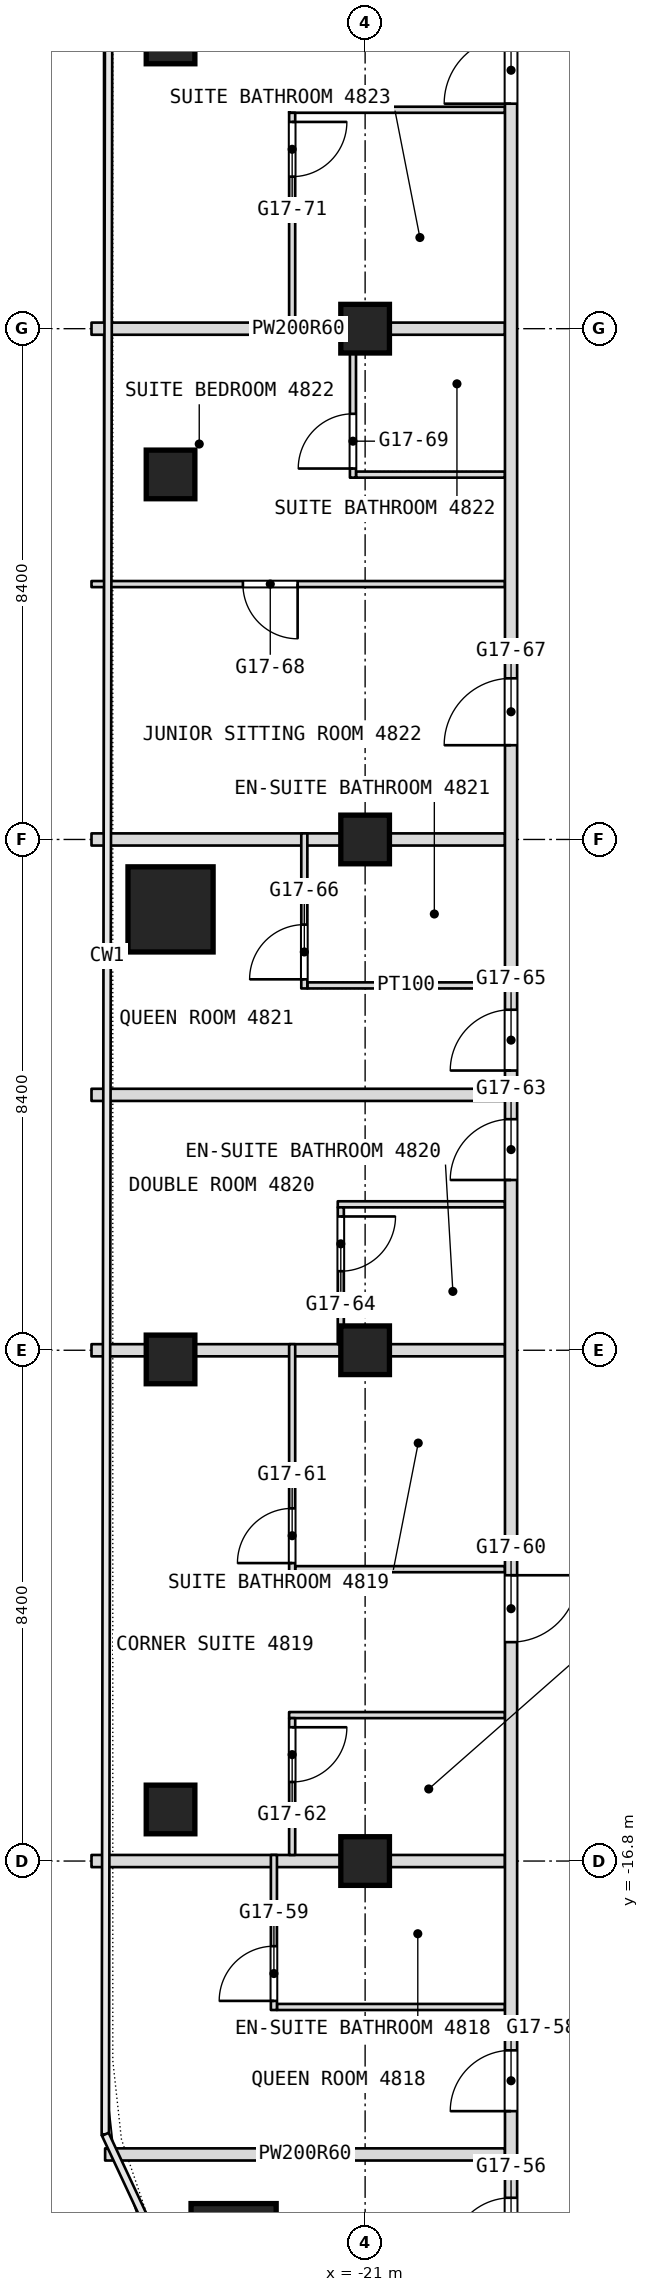
"""IFC4 building model, lengths in metres.
Left out: names, types, materials, properties, quantities, classifications, styles, units other than length and angle.
Written with IfcOpenShell. Run it as: python <this file> out.ifc"""

import sys

from ifc_helpers import new_model, si_unit, direction, frame, frame_2d, origin, origin_2d, place, context, subcontext, project, spatial, rectangle, extrude, element, fill, save


model = new_model("IFC4")
c1 = context("Model", 3, precision=1e-05, world=origin(), true_north=direction((0.0, 1.0)))
c2 = subcontext(c1, "Body", "Model", "MODEL_VIEW")
j1 = project(units=[si_unit("LENGTHUNIT", "METRE"), si_unit("PLANEANGLEUNIT", "RADIAN")], contexts=[c1])
p1 = place(None, origin())
s1 = spatial("IfcSite", under=j1, at=p1, CompositionType="ELEMENT")
p2 = place(p1, origin())
s2 = spatial("IfcBuilding", under=s1, at=p2, CompositionType="ELEMENT")
p3 = place(p2, frame((0.0, 0.0, 209.3)))
s3 = spatial("IfcBuildingStorey", under=s2, at=p3, CompositionType="ELEMENT", Elevation=209.3)
for number, where, z_axis, x_axis in (
    (1, (-23.163, -23.133, 0.0), (0.0, 0.0, 1.0), (1.0, 0.0, 0.0)),
    (2, (-24.2, -1.15, 0.0), (0.0, 0.0, 1.0), (1.0, 0.0, 0.0)),
):
    element("IfcColumn", number, at=place(p3, frame(where, z_axis=z_axis, x_axis=x_axis)), inside=s3, PredefinedType="COLUMN", context=c2, shape_type="SweptSolid", body=[
        extrude(rectangle(XDim=1.4, YDim=1.4, at=origin_2d()), origin(), (0.0, 0.0, 1.0), 3.6),
    ])
for number, where, z_axis, x_axis in (
    (3, (-21.0, -16.8, 0.0), (0.0, 0.0, 1.0), (1.0, 0.0, 0.0)),
    (4, (-21.0, -8.4, 0.0), (0.0, 0.0, 1.0), (1.0, 0.0, 0.0)),
    (5, (-21.0, 0.0, 0.0), (0.0, 0.0, 1.0), (1.0, 0.0, 0.0)),
    (6, (-21.0, 8.4, 0.0), (0.0, 0.0, 1.0), (1.0, 0.0, 0.0)),
    (7, (-24.2, -15.952, 0.0), (0.0, 0.0, 1.0), (1.0, 0.0, 0.0)),
    (8, (-24.2, -8.551, 0.0), (0.0, 0.0, 1.0), (1.0, 0.0, 0.0)),
    (9, (-24.2, 6.003, 0.0), (0.0, 0.0, 1.0), (1.0, 0.0, 0.0)),
    (10, (-24.2, 13.156, 0.0), (0.0, 0.0, 1.0), (1.0, 0.0, 0.0)),
):
    element("IfcColumn", number, at=place(p3, frame(where, z_axis=z_axis, x_axis=x_axis)), inside=s3, PredefinedType="COLUMN", context=c2, shape_type="SweptSolid", body=[
        extrude(rectangle(XDim=0.8, YDim=0.8, at=origin_2d()), origin(), (0.0, 0.0, 1.0), 3.6),
    ])
p4 = place(p3, frame((-25.276, -21.625, 0.0), z_axis=(0.0, 0.0, 1.0), x_axis=(1.0, 0.0, 0.0)))
e11 = element("IfcWall", 11, at=p4, inside=s3, PredefinedType="PARTITIONING", context=c2, shape_type="SweptSolid", body=[
    extrude(rectangle(XDim=6.576, YDim=0.2, at=frame_2d((3.288, 0.0))), origin(), (0.0, 0.0, 1.0), 3.34),
])
p5 = place(p3, frame((-22.45, -19.2, 0.0), z_axis=(0.0, 0.0, 1.0), x_axis=(1.0, 0.0, 0.0)))
e12 = element("IfcWall", 12, at=p5, inside=s3, PredefinedType="PARTITIONING", context=c2, shape_type="SweptSolid", body=[
    extrude(rectangle(XDim=3.75, YDim=0.1, at=frame_2d((1.875, 0.0))), origin(), (0.0, 0.0, 1.0), 3.34),
])
p6 = place(p3, frame((-25.5, -16.8, 0.0), z_axis=(0.0, 0.0, 1.0), x_axis=(1.0, 0.0, 0.0)))
e13 = element("IfcWall", 13, at=p6, inside=s3, PredefinedType="PARTITIONING", context=c2, shape_type="SweptSolid", body=[
    extrude(rectangle(XDim=6.8, YDim=0.2, at=frame_2d((3.4, 0.0))), origin(), (0.0, 0.0, 1.0), 2.94),
])
p7 = place(p3, frame((-22.25, -14.4, 0.0), z_axis=(0.0, 0.0, 1.0), x_axis=(1.0, 0.0, 0.0)))
e14 = element("IfcWall", 14, at=p7, inside=s3, PredefinedType="PARTITIONING", context=c2, shape_type="SweptSolid", body=[
    extrude(rectangle(XDim=3.55, YDim=0.1, at=frame_2d((1.775, 0.0))), origin(), (0.0, 0.0, 1.0), 3.34),
])
p8 = place(p3, frame((-22.15, -12.0, 0.0), z_axis=(0.0, 0.0, 1.0), x_axis=(1.0, 0.0, 0.0)))
e15 = element("IfcWall", 15, at=p8, inside=s3, PredefinedType="PARTITIONING", context=c2, shape_type="SweptSolid", body=[
    extrude(rectangle(XDim=3.45, YDim=0.1, at=frame_2d((1.725, 0.0))), origin(), (0.0, 0.0, 1.0), 3.34),
])
p9 = place(p3, frame((-25.5, -8.4, 0.0), z_axis=(0.0, 0.0, 1.0), x_axis=(1.0, 0.0, 0.0)))
e16 = element("IfcWall", 16, at=p9, inside=s3, PredefinedType="PARTITIONING", context=c2, shape_type="SweptSolid", body=[
    extrude(rectangle(XDim=6.8, YDim=0.2, at=frame_2d((3.4, 0.0))), origin(), (0.0, 0.0, 1.0), 2.94),
])
p10 = place(p3, frame((-21.45, -6.0, 0.0), z_axis=(0.0, 0.0, 1.0), x_axis=(1.0, 0.0, 0.0)))
e17 = element("IfcWall", 17, at=p10, inside=s3, PredefinedType="PARTITIONING", context=c2, shape_type="SweptSolid", body=[
    extrude(rectangle(XDim=2.75, YDim=0.1, at=frame_2d((1.375, 0.0))), origin(), (0.0, 0.0, 1.0), 3.34),
])
p11 = place(p3, frame((-25.5, -4.2, 0.0), z_axis=(0.0, 0.0, 1.0), x_axis=(1.0, 0.0, 0.0)))
e18 = element("IfcWall", 18, at=p11, inside=s3, PredefinedType="PARTITIONING", context=c2, shape_type="SweptSolid", body=[
    extrude(rectangle(XDim=6.8, YDim=0.2, at=frame_2d((3.4, 0.0))), origin(), (0.0, 0.0, 1.0), 3.34),
])
p12 = place(p3, frame((-21.95, -2.4, 0.0), z_axis=(0.0, 0.0, 1.0), x_axis=(1.0, 0.0, 0.0)))
e19 = element("IfcWall", 19, at=p12, inside=s3, PredefinedType="PARTITIONING", context=c2, shape_type="SweptSolid", body=[
    extrude(rectangle(XDim=3.25, YDim=0.1, at=frame_2d((1.625, 0.0))), origin(), (0.0, 0.0, 1.0), 3.34),
])
p13 = place(p3, frame((-25.5, 0.0, 0.0), z_axis=(0.0, 0.0, 1.0), x_axis=(1.0, 0.0, 0.0)))
e20 = element("IfcWall", 20, at=p13, inside=s3, PredefinedType="PARTITIONING", context=c2, shape_type="SweptSolid", body=[
    extrude(rectangle(XDim=6.8, YDim=0.2, at=frame_2d((3.4, 0.0))), origin(), (0.0, 0.0, 1.0), 2.94),
])
p14 = place(p3, frame((-25.5, 4.2, 0.0), z_axis=(0.0, 0.0, 1.0), x_axis=(1.0, 0.0, 0.0)))
e21 = element("IfcWall", 21, at=p14, inside=s3, PredefinedType="PARTITIONING", context=c2, shape_type="SweptSolid", body=[
    extrude(rectangle(XDim=6.8, YDim=0.1, at=frame_2d((3.4, 0.0))), origin(), (0.0, 0.0, 1.0), 3.34),
])
p15 = place(p14, frame((2.49, 0.0, 0.0)))
e22 = element("IfcOpeningElement", 22, at=p15, cuts=e21, PredefinedType="OPENING", context=c2, shape_type="SweptSolid", body=[
    extrude(rectangle(XDim=0.9, YDim=2.1, at=frame_2d((0.45, 1.05))), frame((0.0, 0.05, 0.0), z_axis=(0.0, -1.0, 0.0), x_axis=(1.0, 0.0, 0.0)), (0.0, 0.0, 1.0), 0.1),
])
p16 = place(p3, frame((-21.15, 6.0, 0.0), z_axis=(0.0, 0.0, 1.0), x_axis=(1.0, 0.0, 0.0)))
e23 = element("IfcWall", 23, at=p16, inside=s3, PredefinedType="PARTITIONING", context=c2, shape_type="SweptSolid", body=[
    extrude(rectangle(XDim=2.45, YDim=0.1, at=frame_2d((1.225, 0.0))), origin(), (0.0, 0.0, 1.0), 3.34),
])
p17 = place(p3, frame((-25.5, 8.4, 0.0), z_axis=(0.0, 0.0, 1.0), x_axis=(1.0, 0.0, 0.0)))
e24 = element("IfcWall", 24, at=p17, inside=s3, PredefinedType="PARTITIONING", context=c2, shape_type="SweptSolid", body=[
    extrude(rectangle(XDim=6.8, YDim=0.2, at=frame_2d((3.4, 0.0))), origin(), (0.0, 0.0, 1.0), 2.94),
])
p18 = place(p3, frame((-22.25, 12.0, 0.0), z_axis=(0.0, 0.0, 1.0), x_axis=(1.0, 0.0, 0.0)))
e25 = element("IfcWall", 25, at=p18, inside=s3, PredefinedType="PARTITIONING", context=c2, shape_type="SweptSolid", body=[
    extrude(rectangle(XDim=3.55, YDim=0.1, at=frame_2d((1.775, 0.0))), origin(), (0.0, 0.0, 1.0), 3.34),
])
p19 = place(p3, frame((-18.6, -26.751, 0.0), z_axis=(0.0, 0.0, 1.0), x_axis=(0.0, 1.0, 0.0)))
e26 = element("IfcWall", 26, at=p19, inside=s3, PredefinedType="PARTITIONING", context=c2, shape_type="SweptSolid", body=[
    extrude(rectangle(XDim=49.091, YDim=0.2, at=frame_2d((24.545, 0.0))), origin(), (0.0, 0.0, 1.0), 3.34),
])
p20 = place(p19, frame((3.413, 0.0, 0.0)))
e27 = element("IfcOpeningElement", 27, at=p20, cuts=e26, PredefinedType="OPENING", context=c2, shape_type="SweptSolid", body=[
    extrude(rectangle(XDim=1.0, YDim=2.1, at=frame_2d((0.5, 1.05))), frame((0.0, 0.1, 0.0), z_axis=(0.0, -1.0, 0.0), x_axis=(1.0, 0.0, 0.0)), (0.0, 0.0, 1.0), 0.2),
])
p21 = place(p19, frame((5.838, 0.0, 0.0)))
e28 = element("IfcOpeningElement", 28, at=p21, cuts=e26, PredefinedType="OPENING", context=c2, shape_type="SweptSolid", body=[
    extrude(rectangle(XDim=1.0, YDim=2.1, at=frame_2d((0.5, 1.05))), frame((0.0, 0.1, 0.0), z_axis=(0.0, -1.0, 0.0), x_axis=(1.0, 0.0, 0.0)), (0.0, 0.0, 1.0), 0.2),
])
p22 = place(p19, frame((13.551, 0.0, 0.0)))
e29 = element("IfcOpeningElement", 29, at=p22, cuts=e26, PredefinedType="OPENING", context=c2, shape_type="SweptSolid", body=[
    extrude(rectangle(XDim=1.1, YDim=2.1, at=frame_2d((0.55, 1.05))), frame((0.0, 0.1, 0.0), z_axis=(0.0, -1.0, 0.0), x_axis=(1.0, 0.0, 0.0)), (0.0, 0.0, 1.0), 0.2),
])
p23 = place(p19, frame((21.151, 0.0, 0.0)))
e30 = element("IfcOpeningElement", 30, at=p23, cuts=e26, PredefinedType="OPENING", context=c2, shape_type="SweptSolid", body=[
    extrude(rectangle(XDim=1.0, YDim=2.1, at=frame_2d((0.5, 1.05))), frame((0.0, 0.1, 0.0), z_axis=(0.0, -1.0, 0.0), x_axis=(1.0, 0.0, 0.0)), (0.0, 0.0, 1.0), 0.2),
])
p24 = place(p19, frame((22.951, 0.0, 0.0)))
e31 = element("IfcOpeningElement", 31, at=p24, cuts=e26, PredefinedType="OPENING", context=c2, shape_type="SweptSolid", body=[
    extrude(rectangle(XDim=1.0, YDim=2.1, at=frame_2d((0.5, 1.05))), frame((0.0, 0.1, 0.0), z_axis=(0.0, -1.0, 0.0), x_axis=(1.0, 0.0, 0.0)), (0.0, 0.0, 1.0), 0.2),
])
p25 = place(p19, frame((28.301, 0.0, 0.0)))
e32 = element("IfcOpeningElement", 32, at=p25, cuts=e26, PredefinedType="OPENING", context=c2, shape_type="SweptSolid", body=[
    extrude(rectangle(XDim=1.1, YDim=2.1, at=frame_2d((0.55, 1.05))), frame((0.0, 0.1, 0.0), z_axis=(0.0, -1.0, 0.0), x_axis=(1.0, 0.0, 0.0)), (0.0, 0.0, 1.0), 0.2),
])
p26 = place(p19, frame((38.851, 0.0, 0.0)))
e33 = element("IfcOpeningElement", 33, at=p26, cuts=e26, PredefinedType="OPENING", context=c2, shape_type="SweptSolid", body=[
    extrude(rectangle(XDim=1.1, YDim=2.1, at=frame_2d((0.55, 1.05))), frame((0.0, 0.1, 0.0), z_axis=(0.0, -1.0, 0.0), x_axis=(1.0, 0.0, 0.0)), (0.0, 0.0, 1.0), 0.2),
])
p27 = place(p19, frame((44.051, 0.0, 0.0)))
e34 = element("IfcOpeningElement", 34, at=p27, cuts=e26, PredefinedType="OPENING", context=c2, shape_type="SweptSolid", body=[
    extrude(rectangle(XDim=1.0, YDim=2.1, at=frame_2d((0.5, 1.05))), frame((0.0, 0.1, 0.0), z_axis=(0.0, -1.0, 0.0), x_axis=(1.0, 0.0, 0.0)), (0.0, 0.0, 1.0), 0.2),
])
p28 = place(p3, frame((-21.2, 5.95, 0.0), z_axis=(0.0, 0.0, 1.0), x_axis=(0.0, 1.0, 0.0)))
e35 = element("IfcWall", 35, at=p28, inside=s3, PredefinedType="PARTITIONING", context=c2, shape_type="SweptSolid", body=[
    extrude(rectangle(XDim=2.55, YDim=0.1, at=frame_2d((1.275, 0.0))), origin(), (0.0, 0.0, 1.0), 3.34),
])
p29 = place(p28, frame((0.15, 0.0, 0.0)))
e36 = element("IfcOpeningElement", 36, at=p29, cuts=e35, PredefinedType="OPENING", context=c2, shape_type="SweptSolid", body=[
    extrude(rectangle(XDim=0.9, YDim=2.1, at=frame_2d((0.45, 1.05))), frame((0.0, 0.05, 0.0), z_axis=(0.0, -1.0, 0.0), x_axis=(1.0, 0.0, 0.0)), (0.0, 0.0, 1.0), 0.1),
])
p30 = place(p3, frame((-21.4, -8.3, 0.0), z_axis=(0.0, 0.0, 1.0), x_axis=(0.0, 1.0, 0.0)))
e37 = element("IfcWall", 37, at=p30, inside=s3, PredefinedType="PARTITIONING", context=c2, shape_type="SweptSolid", body=[
    extrude(rectangle(XDim=2.25, YDim=0.1, at=frame_2d((1.125, 0.0))), origin(), (0.0, 0.0, 1.0), 3.34),
])
p31 = place(p30, frame((1.2, 0.0, 0.0)))
e38 = element("IfcOpeningElement", 38, at=p31, cuts=e37, PredefinedType="OPENING", context=c2, shape_type="SweptSolid", body=[
    extrude(rectangle(XDim=0.9, YDim=2.1, at=frame_2d((0.45, 1.05))), frame((0.0, 0.05, 0.0), z_axis=(0.0, -1.0, 0.0), x_axis=(1.0, 0.0, 0.0)), (0.0, 0.0, 1.0), 0.1),
])
p32 = place(p3, frame((-22.0, -2.45, 0.0), z_axis=(0.0, 0.0, 1.0), x_axis=(0.0, 1.0, 0.0)))
e39 = element("IfcWall", 39, at=p32, inside=s3, PredefinedType="PARTITIONING", context=c2, shape_type="SweptSolid", body=[
    extrude(rectangle(XDim=2.55, YDim=0.1, at=frame_2d((1.275, 0.0))), origin(), (0.0, 0.0, 1.0), 3.34),
])
p33 = place(p32, frame((0.15, 0.0, 0.0)))
e40 = element("IfcOpeningElement", 40, at=p33, cuts=e39, PredefinedType="OPENING", context=c2, shape_type="SweptSolid", body=[
    extrude(rectangle(XDim=0.9, YDim=2.1, at=frame_2d((0.45, 1.05))), frame((0.0, 0.05, 0.0), z_axis=(0.0, -1.0, 0.0), x_axis=(1.0, 0.0, 0.0)), (0.0, 0.0, 1.0), 0.1),
])
p34 = place(p3, frame((-22.2, -16.7, 0.0), z_axis=(0.0, 0.0, 1.0), x_axis=(0.0, 1.0, 0.0)))
e41 = element("IfcWall", 41, at=p34, inside=s3, PredefinedType="PARTITIONING", context=c2, shape_type="SweptSolid", body=[
    extrude(rectangle(XDim=2.25, YDim=0.1, at=frame_2d((1.125, 0.0))), origin(), (0.0, 0.0, 1.0), 3.34),
])
p35 = place(p34, frame((1.2, 0.0, 0.0)))
e42 = element("IfcOpeningElement", 42, at=p35, cuts=e41, PredefinedType="OPENING", context=c2, shape_type="SweptSolid", body=[
    extrude(rectangle(XDim=0.9, YDim=2.1, at=frame_2d((0.45, 1.05))), frame((0.0, 0.05, 0.0), z_axis=(0.0, -1.0, 0.0), x_axis=(1.0, 0.0, 0.0)), (0.0, 0.0, 1.0), 0.1),
])
p36 = place(p3, frame((-22.2, -12.05, 0.0), z_axis=(0.0, 0.0, 1.0), x_axis=(0.0, 1.0, 0.0)))
e43 = element("IfcWall", 43, at=p36, inside=s3, PredefinedType="PARTITIONING", context=c2, shape_type="SweptSolid", body=[
    extrude(rectangle(XDim=3.75, YDim=0.1, at=frame_2d((1.875, 0.0))), origin(), (0.0, 0.0, 1.0), 3.34),
])
p37 = place(p36, frame((0.15, 0.0, 0.0)))
e44 = element("IfcOpeningElement", 44, at=p37, cuts=e43, PredefinedType="OPENING", context=c2, shape_type="SweptSolid", body=[
    extrude(rectangle(XDim=0.9, YDim=2.1, at=frame_2d((0.45, 1.05))), frame((0.0, 0.05, 0.0), z_axis=(0.0, -1.0, 0.0), x_axis=(1.0, 0.0, 0.0)), (0.0, 0.0, 1.0), 0.1),
])
p38 = place(p3, frame((-22.2, 8.5, 0.0), z_axis=(0.0, 0.0, 1.0), x_axis=(0.0, 1.0, 0.0)))
e45 = element("IfcWall", 45, at=p38, inside=s3, PredefinedType="PARTITIONING", context=c2, shape_type="SweptSolid", body=[
    extrude(rectangle(XDim=3.45, YDim=0.1, at=frame_2d((1.725, 0.0))), origin(), (0.0, 0.0, 1.0), 3.34),
])
p39 = place(p38, frame((2.4, 0.0, 0.0)))
e46 = element("IfcOpeningElement", 46, at=p39, cuts=e45, PredefinedType="OPENING", context=c2, shape_type="SweptSolid", body=[
    extrude(rectangle(XDim=0.9, YDim=2.1, at=frame_2d((0.45, 1.05))), frame((0.0, 0.05, 0.0), z_axis=(0.0, -1.0, 0.0), x_axis=(1.0, 0.0, 0.0)), (0.0, 0.0, 1.0), 0.1),
])
p40 = place(p3, frame((-22.5, -19.25, 0.0), z_axis=(0.0, 0.0, 1.0), x_axis=(0.0, 1.0, 0.0)))
e47 = element("IfcWall", 47, at=p40, inside=s3, PredefinedType="PARTITIONING", context=c2, shape_type="SweptSolid", body=[
    extrude(rectangle(XDim=2.55, YDim=0.1, at=frame_2d((1.275, 0.0))), origin(), (0.0, 0.0, 1.0), 3.34),
])
p41 = place(p40, frame((0.15, 0.0, 0.0)))
e48 = element("IfcOpeningElement", 48, at=p41, cuts=e47, PredefinedType="OPENING", context=c2, shape_type="SweptSolid", body=[
    extrude(rectangle(XDim=0.9, YDim=2.1, at=frame_2d((0.45, 1.05))), frame((0.0, 0.05, 0.0), z_axis=(0.0, -1.0, 0.0), x_axis=(1.0, 0.0, 0.0)), (0.0, 0.0, 1.0), 0.1),
])
p42 = place(p15, origin())
e49 = element("IfcDoor", 49, at=p42, inside=s3, OperationType="SINGLE_SWING_LEFT", PredefinedType="DOOR", context=c2, shape_type="SweptSolid", body=[
    extrude(rectangle(XDim=0.9, YDim=2.1, at=frame_2d((0.45, 1.05))), frame((0.0, 0.025, 0.0), z_axis=(0.0, -1.0, 0.0), x_axis=(1.0, 0.0, 0.0)), (0.0, 0.0, 1.0), 0.05),
])
fill(e22, e49)
p43 = place(p20, origin())
e50 = element("IfcDoor", 50, at=p43, inside=s3, OperationType="SINGLE_SWING_LEFT", PredefinedType="DOOR", context=c2, shape_type="SweptSolid", body=[
    extrude(rectangle(XDim=1.0, YDim=2.1, at=frame_2d((0.5, 1.05))), frame((0.0, 0.025, 0.0), z_axis=(0.0, -1.0, 0.0), x_axis=(1.0, 0.0, 0.0)), (0.0, 0.0, 1.0), 0.05),
])
fill(e27, e50)
p44 = place(p21, origin())
e51 = element("IfcDoor", 51, at=p44, inside=s3, OperationType="SINGLE_SWING_LEFT", PredefinedType="DOOR", context=c2, shape_type="SweptSolid", body=[
    extrude(rectangle(XDim=1.0, YDim=2.1, at=frame_2d((0.5, 1.05))), frame((0.0, 0.025, 0.0), z_axis=(0.0, -1.0, 0.0), x_axis=(1.0, 0.0, 0.0)), (0.0, 0.0, 1.0), 0.05),
])
fill(e28, e51)
p45 = place(p22, origin())
e52 = element("IfcDoor", 52, at=p45, inside=s3, OperationType="SINGLE_SWING_RIGHT", PredefinedType="DOOR", context=c2, shape_type="SweptSolid", body=[
    extrude(rectangle(XDim=1.1, YDim=2.1, at=frame_2d((0.55, 1.05))), frame((0.0, 0.025, 0.0), z_axis=(0.0, -1.0, 0.0), x_axis=(1.0, 0.0, 0.0)), (0.0, 0.0, 1.0), 0.05),
])
fill(e29, e52)
p46 = place(p23, origin())
e53 = element("IfcDoor", 53, at=p46, inside=s3, OperationType="SINGLE_SWING_RIGHT", PredefinedType="DOOR", context=c2, shape_type="SweptSolid", body=[
    extrude(rectangle(XDim=1.0, YDim=2.1, at=frame_2d((0.5, 1.05))), frame((0.0, 0.025, 0.0), z_axis=(0.0, -1.0, 0.0), x_axis=(1.0, 0.0, 0.0)), (0.0, 0.0, 1.0), 0.05),
])
fill(e30, e53)
p47 = place(p24, origin())
e54 = element("IfcDoor", 54, at=p47, inside=s3, OperationType="SINGLE_SWING_RIGHT", PredefinedType="DOOR", context=c2, shape_type="SweptSolid", body=[
    extrude(rectangle(XDim=1.0, YDim=2.1, at=frame_2d((0.5, 1.05))), frame((0.0, 0.025, 0.0), z_axis=(0.0, -1.0, 0.0), x_axis=(1.0, 0.0, 0.0)), (0.0, 0.0, 1.0), 0.05),
])
fill(e31, e54)
p48 = place(p25, origin())
e55 = element("IfcDoor", 55, at=p48, inside=s3, OperationType="SINGLE_SWING_RIGHT", PredefinedType="DOOR", context=c2, shape_type="SweptSolid", body=[
    extrude(rectangle(XDim=1.1, YDim=2.1, at=frame_2d((0.55, 1.05))), frame((0.0, 0.025, 0.0), z_axis=(0.0, -1.0, 0.0), x_axis=(1.0, 0.0, 0.0)), (0.0, 0.0, 1.0), 0.05),
])
fill(e32, e55)
p49 = place(p26, origin())
e56 = element("IfcDoor", 56, at=p49, inside=s3, OperationType="SINGLE_SWING_LEFT", PredefinedType="DOOR", context=c2, shape_type="SweptSolid", body=[
    extrude(rectangle(XDim=1.1, YDim=2.1, at=frame_2d((0.55, 1.05))), frame((0.0, 0.025, 0.0), z_axis=(0.0, -1.0, 0.0), x_axis=(1.0, 0.0, 0.0)), (0.0, 0.0, 1.0), 0.05),
])
fill(e33, e56)
p50 = place(p29, origin())
e57 = element("IfcDoor", 57, at=p50, inside=s3, OperationType="SINGLE_SWING_RIGHT", PredefinedType="DOOR", context=c2, shape_type="SweptSolid", body=[
    extrude(rectangle(XDim=0.9, YDim=2.1, at=frame_2d((0.45, 1.05))), frame((0.0, 0.025, 0.0), z_axis=(0.0, -1.0, 0.0), x_axis=(1.0, 0.0, 0.0)), (0.0, 0.0, 1.0), 0.05),
])
fill(e36, e57)
p51 = place(p31, origin())
e58 = element("IfcDoor", 58, at=p51, inside=s3, OperationType="SINGLE_SWING_LEFT", PredefinedType="DOOR", context=c2, shape_type="SweptSolid", body=[
    extrude(rectangle(XDim=0.9, YDim=2.1, at=frame_2d((0.45, 1.05))), frame((0.0, 0.025, 0.0), z_axis=(0.0, -1.0, 0.0), x_axis=(1.0, 0.0, 0.0)), (0.0, 0.0, 1.0), 0.05),
])
fill(e38, e58)
p52 = place(p33, origin())
e59 = element("IfcDoor", 59, at=p52, inside=s3, OperationType="SINGLE_SWING_RIGHT", PredefinedType="DOOR", context=c2, shape_type="SweptSolid", body=[
    extrude(rectangle(XDim=0.9, YDim=2.1, at=frame_2d((0.45, 1.05))), frame((0.0, 0.025, 0.0), z_axis=(0.0, -1.0, 0.0), x_axis=(1.0, 0.0, 0.0)), (0.0, 0.0, 1.0), 0.05),
])
fill(e40, e59)
p53 = place(p35, origin())
e60 = element("IfcDoor", 60, at=p53, inside=s3, OperationType="SINGLE_SWING_LEFT", PredefinedType="DOOR", context=c2, shape_type="SweptSolid", body=[
    extrude(rectangle(XDim=0.9, YDim=2.1, at=frame_2d((0.45, 1.05))), frame((0.0, 0.025, 0.0), z_axis=(0.0, -1.0, 0.0), x_axis=(1.0, 0.0, 0.0)), (0.0, 0.0, 1.0), 0.05),
])
fill(e42, e60)
p54 = place(p37, origin())
e61 = element("IfcDoor", 61, at=p54, inside=s3, OperationType="SINGLE_SWING_RIGHT", PredefinedType="DOOR", context=c2, shape_type="SweptSolid", body=[
    extrude(rectangle(XDim=0.9, YDim=2.1, at=frame_2d((0.45, 1.05))), frame((0.0, 0.025, 0.0), z_axis=(0.0, -1.0, 0.0), x_axis=(1.0, 0.0, 0.0)), (0.0, 0.0, 1.0), 0.05),
])
fill(e44, e61)
p55 = place(p39, origin())
e62 = element("IfcDoor", 62, at=p55, inside=s3, OperationType="SINGLE_SWING_LEFT", PredefinedType="DOOR", context=c2, shape_type="SweptSolid", body=[
    extrude(rectangle(XDim=0.9, YDim=2.1, at=frame_2d((0.45, 1.05))), frame((0.0, 0.025, 0.0), z_axis=(0.0, -1.0, 0.0), x_axis=(1.0, 0.0, 0.0)), (0.0, 0.0, 1.0), 0.05),
])
fill(e46, e62)
p56 = place(p41, origin())
e63 = element("IfcDoor", 63, at=p56, inside=s3, OperationType="SINGLE_SWING_RIGHT", PredefinedType="DOOR", context=c2, shape_type="SweptSolid", body=[
    extrude(rectangle(XDim=0.9, YDim=2.1, at=frame_2d((0.45, 1.05))), frame((0.0, 0.025, 0.0), z_axis=(0.0, -1.0, 0.0), x_axis=(1.0, 0.0, 0.0)), (0.0, 0.0, 1.0), 0.05),
])
fill(e48, e63)
save(model, sys.argv[1])
